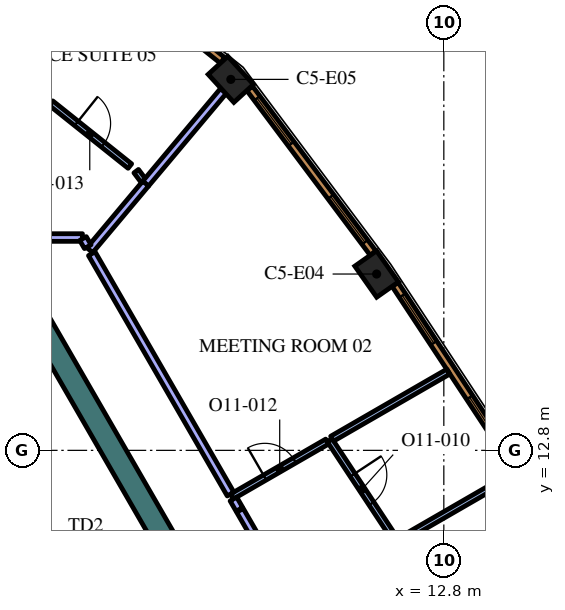
"""IFC4 building model, lengths in metres.
Left out: names, types, materials, properties, quantities, classifications, styles, units other than length and angle.
Written with IfcOpenShell. Run it as: python <this file> out.ifc"""

import sys

from ifc_helpers import new_model, si_unit, direction, frame, frame_2d, origin, origin_2d, place, context, subcontext, project, spatial, rectangle, extrude, element, fill, save


model = new_model("IFC4")
c1 = context("Model", 3, precision=1e-05, world=origin(), true_north=direction((0.0, 1.0)))
c2 = subcontext(c1, "Body", "Model", "MODEL_VIEW")
j1 = project(units=[si_unit("LENGTHUNIT", "METRE"), si_unit("PLANEANGLEUNIT", "RADIAN")], contexts=[c1])
p1 = place(None, origin())
s1 = spatial("IfcSite", under=j1, at=p1, CompositionType="ELEMENT")
p2 = place(p1, origin())
s2 = spatial("IfcBuilding", under=s1, at=p2, CompositionType="ELEMENT")
p3 = place(p2, frame((0.0, 0.0, 275.4)))
s3 = spatial("IfcBuildingStorey", under=s2, at=p3, CompositionType="ELEMENT", Elevation=275.4)
for number, where, z_axis, x_axis in (
    (1, (11.032, 17.44, 0.0), (0.0, 0.0, 1.0), (-0.575, 0.818, 0.0)),
    (2, (7.195, 22.561, 0.0), (0.0, 0.0, 1.0), (-0.676, 0.737, 0.0)),
):
    element("IfcColumn", number, at=place(p3, frame(where, z_axis=z_axis, x_axis=x_axis)), inside=s3, PredefinedType="COLUMN", context=c2, shape_type="SweptSolid", body=[
        extrude(rectangle(XDim=1.0, YDim=0.7, at=origin_2d()), origin(), (0.0, 0.0, 1.0), 4.2),
    ])
p4 = place(p3, frame((1.989, 16.456, 0.0), z_axis=(0.0, 0.0, 1.0), x_axis=(0.49999102663, -0.8660305845, 0.0)))
e3 = element("IfcWall", 3, at=p4, inside=s3, PredefinedType="SOLIDWALL", context=c2, shape_type="SweptSolid", body=[
    extrude(rectangle(XDim=12.406, YDim=0.6, at=frame_2d((6.203, 0.0))), origin(), (0.0, 0.0, 1.0), 4.2),
])
p5 = place(p3, frame((11.564, 10.387, 0.0), z_axis=(0.0, 0.0, 1.0), x_axis=(0.86604641216, 0.499963610661, 0.0)))
e4 = element("IfcWall", 4, at=p5, inside=s3, PredefinedType="PARTITIONING", context=c2, shape_type="SweptSolid", body=[
    extrude(rectangle(XDim=3.096, YDim=0.15, at=frame_2d((1.548, 0.0))), origin(), (0.0, 0.0, 1.0), 3.55),
])
p6 = place(p3, frame((9.795, 13.068, 0.0), z_axis=(0.0, 0.0, 1.0), x_axis=(0.550767347659, -0.834658809786, 0.0)))
e5 = element("IfcWall", 5, at=p6, inside=s3, PredefinedType="PARTITIONING", context=c2, shape_type="SweptSolid", body=[
    extrude(rectangle(XDim=2.999, YDim=0.15, at=frame_2d((1.5, 0.0))), origin(), (0.0, 0.0, 1.0), 3.55),
])
p7 = place(p6, frame((1.099, 0.0, 0.0)))
e6 = element("IfcOpeningElement", 6, at=p7, cuts=e5, PredefinedType="OPENING", context=c2, shape_type="SweptSolid", body=[
    extrude(rectangle(XDim=0.9, YDim=2.1, at=frame_2d((0.45, 1.05))), frame((0.0, 0.085, 0.0), z_axis=(0.0, -1.0, 0.0), x_axis=(1.0, 0.0, 0.0)), (0.0, 0.0, 1.0), 0.17),
])
p8 = place(p3, frame((9.86, 13.106, 0.0), z_axis=(0.0, 0.0, 1.0), x_axis=(0.866022094817, 0.500005731256, 0.0)))
e7 = element("IfcWall", 7, at=p8, inside=s3, PredefinedType="PARTITIONING", context=c2, shape_type="SweptSolid", body=[
    extrude(rectangle(XDim=3.531, YDim=0.15, at=frame_2d((1.766, 0.0))), origin(), (0.0, 0.0, 1.0), 3.55),
])
p9 = place(p3, frame((7.226, 11.585, 0.0), z_axis=(0.0, 0.0, 1.0), x_axis=(0.866021079084, 0.500007490527, 0.0)))
e8 = element("IfcWall", 8, at=p9, inside=s3, PredefinedType="PARTITIONING", context=c2, shape_type="SweptSolid", body=[
    extrude(rectangle(XDim=2.892, YDim=0.15, at=frame_2d((1.446, 0.0))), origin(), (0.0, 0.0, 1.0), 3.55),
])
p10 = place(p9, frame((1.0, 0.0, 0.0)))
e9 = element("IfcOpeningElement", 9, at=p10, cuts=e8, PredefinedType="OPENING", context=c2, shape_type="SweptSolid", body=[
    extrude(rectangle(XDim=0.9, YDim=2.1, at=frame_2d((0.45, 1.05))), frame((0.0, 0.085, 0.0), z_axis=(0.0, -1.0, 0.0), x_axis=(1.0, 0.0, 0.0)), (0.0, 0.0, 1.0), 0.17),
])
p11 = place(p3, frame((13.436, 0.829, 0.0), z_axis=(0.0, 0.0, 1.0), x_axis=(-0.49999894854, 0.866026010844, 0.0)))
e10 = element("IfcWall", 10, at=p11, inside=s3, PredefinedType="PARTITIONING", context=c2, shape_type="SweptSolid", body=[
    extrude(rectangle(XDim=12.0, YDim=0.2, at=frame_2d((6.0, 0.0))), origin(), (0.0, 0.0, 1.0), 3.55),
])
p12 = place(p11, frame((5.5, 0.0, 0.0)))
e11 = element("IfcOpeningElement", 11, at=p12, cuts=e10, PredefinedType="OPENING", context=c2, shape_type="SweptSolid", body=[
    extrude(rectangle(XDim=1.0, YDim=2.1, at=frame_2d((0.5, 1.05))), frame((0.0, 0.11, 0.0), z_axis=(0.0, -1.0, 0.0), x_axis=(1.0, 0.0, 0.0)), (0.0, 0.0, 1.0), 0.22),
])
p13 = place(p3, frame((7.421, 11.247, 0.0), z_axis=(0.0, 0.0, 1.0), x_axis=(-0.500303403544, 0.865850162789, 0.0)))
e12 = element("IfcWall", 12, at=p13, inside=s3, PredefinedType="PARTITIONING", context=c2, shape_type="SweptSolid", body=[
    extrude(rectangle(XDim=0.315, YDim=0.2, at=frame_2d((0.158, 0.0))), origin(), (0.0, 0.0, 1.0), 3.55),
])
p14 = place(p3, frame((4.95, 19.814, 0.0), z_axis=(0.0, 0.0, 1.0), x_axis=(0.642981953866, 0.765881326971, 0.0)))
e13 = element("IfcWall", 13, at=p14, inside=s3, PredefinedType="PARTITIONING", context=c2, shape_type="SweptSolid", body=[
    extrude(rectangle(XDim=3.188, YDim=0.2, at=frame_2d((1.594, 0.0))), origin(), (0.0, 0.0, 1.0), 3.55),
])
p15 = place(p3, frame((3.483, 18.067, 0.0), z_axis=(0.0, 0.0, 1.0), x_axis=(0.642896944312, 0.765952687177, 0.0)))
e14 = element("IfcWall", 14, at=p15, inside=s3, PredefinedType="PARTITIONING", context=c2, shape_type="SweptSolid", body=[
    extrude(rectangle(XDim=2.29, YDim=0.2, at=frame_2d((1.145, 0.0))), origin(), (0.0, 0.0, 1.0), 3.55),
])
p16 = place(p3, frame((7.188, 11.65, 0.0), z_axis=(0.0, 0.0, 1.0), x_axis=(-0.499989634868, 0.866031388014, 0.0)))
e15 = element("IfcWall", 15, at=p16, inside=s3, PredefinedType="PARTITIONING", context=c2, shape_type="SweptSolid", body=[
    extrude(rectangle(XDim=7.303, YDim=0.2, at=frame_2d((3.652, 0.0))), origin(), (0.0, 0.0, 1.0), 3.55),
])
p17 = place(p3, frame((4.891, 19.899, 0.0), z_axis=(0.0, 0.0, 1.0), x_axis=(-0.6, 0.8, 0.0)))
e16 = element("IfcWall", 16, at=p17, inside=s3, PredefinedType="PARTITIONING", context=c2, shape_type="SweptSolid", body=[
    extrude(rectangle(XDim=0.309, YDim=0.15, at=frame_2d((0.154, 0.0))), origin(), (0.0, 0.0, 1.0), 3.55),
])
p18 = place(p3, frame((2.462, 21.937, 0.0), z_axis=(0.0, 0.0, 1.0), x_axis=(0.781630346222, -0.62374193531, 0.0)))
e17 = element("IfcWall", 17, at=p18, inside=s3, PredefinedType="PARTITIONING", context=c2, shape_type="SweptSolid", body=[
    extrude(rectangle(XDim=2.656, YDim=0.15, at=frame_2d((1.328, 0.0))), origin(), (0.0, 0.0, 1.0), 3.55),
])
p19 = place(p18, frame((0.857, 0.0, 0.0)))
e18 = element("IfcOpeningElement", 18, at=p19, cuts=e17, PredefinedType="OPENING", context=c2, shape_type="SweptSolid", body=[
    extrude(rectangle(XDim=0.9, YDim=2.1, at=frame_2d((0.45, 1.05))), frame((0.0, 0.085, 0.0), z_axis=(0.0, -1.0, 0.0), x_axis=(1.0, 0.0, 0.0)), (0.0, 0.0, 1.0), 0.17),
])
p20 = place(p3, frame((3.291, 18.4, 0.0), z_axis=(0.0, 0.0, 1.0), x_axis=(-1.0, 0.0, 0.0)))
e19 = element("IfcWall", 19, at=p20, inside=s3, PredefinedType="PARTITIONING", context=c2, shape_type="SweptSolid", body=[
    extrude(rectangle(XDim=6.582, YDim=0.2, at=frame_2d((3.291, 0.0))), origin(), (0.0, 0.0, 1.0), 3.55),
])
p21 = place(p3, frame((3.43, 18.159, 0.0), z_axis=(0.0, 0.0, 1.0), x_axis=(-0.499949632511, 0.866054481515, 0.0)))
e20 = element("IfcWall", 20, at=p21, inside=s3, PredefinedType="PARTITIONING", context=c2, shape_type="SweptSolid", body=[
    extrude(rectangle(XDim=0.248, YDim=0.2, at=frame_2d((0.124, 0.0))), origin(), (0.0, 0.0, 1.0), 3.55),
])
p22 = place(p3, frame((14.496, 12.653, 0.0), z_axis=(0.0, 0.0, 1.0), x_axis=(-0.550744054781, 0.83467417962, 0.0)))
e21 = element("IfcWall", 21, at=p22, inside=s3, PredefinedType="SOLIDWALL", context=c2, shape_type="SweptSolid", body=[
    extrude(rectangle(XDim=5.406, YDim=0.19, at=frame_2d((2.703, 0.0))), origin(), (0.0, 0.0, 1.0), 3.95),
])
p23 = place(p22, frame((0.346, 0.0, 0.6)))
e22 = element("IfcOpeningElement", 22, at=p23, cuts=e21, PredefinedType="OPENING", context=c2, shape_type="SweptSolid", body=[
    extrude(rectangle(XDim=1.5, YDim=2.85, at=frame_2d((0.75, 1.425))), frame((0.0, 0.105, 0.0), z_axis=(0.0, -1.0, 0.0), x_axis=(1.0, 0.0, 0.0)), (0.0, 0.0, 1.0), 0.21),
])
p24 = place(p22, frame((3.559, 0.0, 0.6)))
e23 = element("IfcOpeningElement", 23, at=p24, cuts=e21, PredefinedType="OPENING", context=c2, shape_type="SweptSolid", body=[
    extrude(rectangle(XDim=1.5, YDim=2.85, at=frame_2d((0.75, 1.425))), frame((0.0, 0.105, 0.0), z_axis=(0.0, -1.0, 0.0), x_axis=(1.0, 0.0, 0.0)), (0.0, 0.0, 1.0), 0.21),
])
p25 = place(p3, frame((10.938, 17.99, 0.0), z_axis=(0.0, 0.0, 1.0), x_axis=(-0.599559865294, 0.800329911929, 0.0)))
e24 = element("IfcWall", 24, at=p25, inside=s3, PredefinedType="SOLIDWALL", context=c2, shape_type="SweptSolid", body=[
    extrude(rectangle(XDim=5.415, YDim=0.19, at=frame_2d((2.708, 0.0))), origin(), (0.0, 0.0, 1.0), 3.95),
])
p26 = place(p25, frame((0.358, 0.0, 0.6)))
e25 = element("IfcOpeningElement", 25, at=p26, cuts=e24, PredefinedType="OPENING", context=c2, shape_type="SweptSolid", body=[
    extrude(rectangle(XDim=1.5, YDim=2.85, at=frame_2d((0.75, 1.425))), frame((0.0, 0.105, 0.0), z_axis=(0.0, -1.0, 0.0), x_axis=(1.0, 0.0, 0.0)), (0.0, 0.0, 1.0), 0.21),
])
p27 = place(p25, frame((3.593, 0.0, 0.6)))
e26 = element("IfcOpeningElement", 26, at=p27, cuts=e24, PredefinedType="OPENING", context=c2, shape_type="SweptSolid", body=[
    extrude(rectangle(XDim=1.5, YDim=2.85, at=frame_2d((0.75, 1.425))), frame((0.0, 0.105, 0.0), z_axis=(0.0, -1.0, 0.0), x_axis=(1.0, 0.0, 0.0)), (0.0, 0.0, 1.0), 0.21),
])
p28 = place(p3, frame((6.977, 23.061, 0.0), z_axis=(0.0, 0.0, 1.0), x_axis=(-0.781626234064, 0.623747088349, 0.0)))
e27 = element("IfcWall", 27, at=p28, inside=s3, PredefinedType="SOLIDWALL", context=c2, shape_type="SweptSolid", body=[
    extrude(rectangle(XDim=3.237, YDim=0.19, at=frame_2d((1.618, 0.0))), origin(), (0.0, 0.0, 1.0), 3.95),
])
p29 = place(p28, frame((1.068, 0.0, 0.6)))
e28 = element("IfcOpeningElement", 28, at=p29, cuts=e27, PredefinedType="OPENING", context=c2, shape_type="SweptSolid", body=[
    extrude(rectangle(XDim=1.1, YDim=2.85, at=frame_2d((0.55, 1.425))), frame((0.0, 0.105, 0.0), z_axis=(0.0, -1.0, 0.0), x_axis=(1.0, 0.0, 0.0)), (0.0, 0.0, 1.0), 0.21),
])
p30 = place(p7, origin())
e29 = element("IfcDoor", 29, at=p30, inside=s3, OperationType="SINGLE_SWING_RIGHT", PredefinedType="DOOR", context=c2, shape_type="SweptSolid", body=[
    extrude(rectangle(XDim=0.9, YDim=2.1, at=frame_2d((0.45, 1.05))), frame((0.0, 0.025, 0.0), z_axis=(0.0, -1.0, 0.0), x_axis=(1.0, 0.0, 0.0)), (0.0, 0.0, 1.0), 0.05),
])
fill(e6, e29)
p31 = place(p10, origin())
e30 = element("IfcDoor", 30, at=p31, inside=s3, OperationType="SINGLE_SWING_RIGHT", PredefinedType="DOOR", context=c2, shape_type="SweptSolid", body=[
    extrude(rectangle(XDim=0.9, YDim=2.1, at=frame_2d((0.45, 1.05))), frame((0.0, 0.025, 0.0), z_axis=(0.0, -1.0, 0.0), x_axis=(1.0, 0.0, 0.0)), (0.0, 0.0, 1.0), 0.05),
])
fill(e9, e30)
p32 = place(p19, origin())
e31 = element("IfcDoor", 31, at=p32, inside=s3, OperationType="SINGLE_SWING_LEFT", PredefinedType="DOOR", context=c2, shape_type="SweptSolid", body=[
    extrude(rectangle(XDim=0.9, YDim=2.1, at=frame_2d((0.45, 1.05))), frame((0.0, 0.025, 0.0), z_axis=(0.0, -1.0, 0.0), x_axis=(1.0, 0.0, 0.0)), (0.0, 0.0, 1.0), 0.05),
])
fill(e18, e31)
p33 = place(p23, origin())
e32 = element("IfcWindow", 32, at=p33, inside=s3, PartitioningType="SINGLE_PANEL", PredefinedType="WINDOW", context=c2, shape_type="SweptSolid", body=[
    extrude(rectangle(XDim=1.5, YDim=2.85, at=frame_2d((0.75, 1.425))), frame((0.0, 0.045, 0.0), z_axis=(0.0, -1.0, 0.0), x_axis=(1.0, 0.0, 0.0)), (0.0, 0.0, 1.0), 0.06),
])
fill(e22, e32)
p34 = place(p24, origin())
e33 = element("IfcWindow", 33, at=p34, inside=s3, PartitioningType="SINGLE_PANEL", PredefinedType="WINDOW", context=c2, shape_type="SweptSolid", body=[
    extrude(rectangle(XDim=1.5, YDim=2.85, at=frame_2d((0.75, 1.425))), frame((0.0, 0.045, 0.0), z_axis=(0.0, -1.0, 0.0), x_axis=(1.0, 0.0, 0.0)), (0.0, 0.0, 1.0), 0.06),
])
fill(e23, e33)
p35 = place(p26, origin())
e34 = element("IfcWindow", 34, at=p35, inside=s3, PartitioningType="SINGLE_PANEL", PredefinedType="WINDOW", context=c2, shape_type="SweptSolid", body=[
    extrude(rectangle(XDim=1.5, YDim=2.85, at=frame_2d((0.75, 1.425))), frame((0.0, 0.045, 0.0), z_axis=(0.0, -1.0, 0.0), x_axis=(1.0, 0.0, 0.0)), (0.0, 0.0, 1.0), 0.06),
])
fill(e25, e34)
p36 = place(p27, origin())
e35 = element("IfcWindow", 35, at=p36, inside=s3, PartitioningType="SINGLE_PANEL", PredefinedType="WINDOW", context=c2, shape_type="SweptSolid", body=[
    extrude(rectangle(XDim=1.5, YDim=2.85, at=frame_2d((0.75, 1.425))), frame((0.0, 0.045, 0.0), z_axis=(0.0, -1.0, 0.0), x_axis=(1.0, 0.0, 0.0)), (0.0, 0.0, 1.0), 0.06),
])
fill(e26, e35)
save(model, sys.argv[1])
